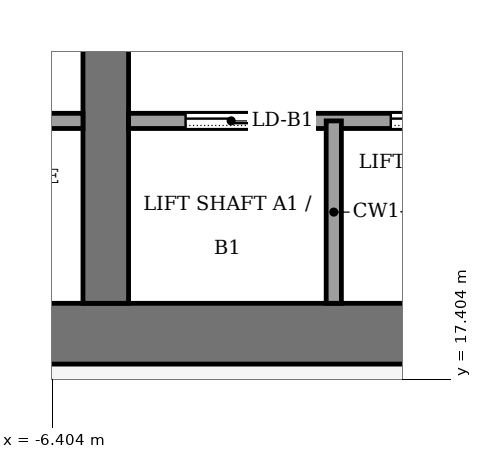
"""IFC4 building model, lengths in metres.
Left out: names, types, materials, properties, quantities, classifications, styles, units other than length and angle.
Written with IfcOpenShell. Run it as: python <this file> out.ifc"""

import sys

from ifc_helpers import new_model, si_unit, direction, frame, frame_2d, origin, place, context, subcontext, project, spatial, rectangle, extrude, element, fill, save


model = new_model("IFC4")
c1 = context("Model", 3, precision=1e-05, world=origin(), true_north=direction((0.0, 1.0)))
c2 = subcontext(c1, "Body", "Model", "MODEL_VIEW")
j1 = project(units=[si_unit("LENGTHUNIT", "METRE"), si_unit("PLANEANGLEUNIT", "RADIAN")], contexts=[c1])
p1 = place(None, origin())
s1 = spatial("IfcSite", under=j1, at=p1, CompositionType="ELEMENT")
p2 = place(p1, origin())
s2 = spatial("IfcBuilding", under=s1, at=p2, CompositionType="ELEMENT")
p3 = place(p2, frame((0.0, 0.0, 242.0)))
s3 = spatial("IfcBuildingStorey", under=s2, at=p3, CompositionType="ELEMENT", Elevation=242.0)
p4 = place(p3, frame((-13.4, 18.0, -0.13), z_axis=(0.0, 0.0, 1.0), x_axis=(1.0, 0.0, 0.0)))
e1 = element("IfcWall", 1, at=p4, inside=s3, PredefinedType="SHEAR", context=c2, shape_type="SweptSolid", body=[
    extrude(rectangle(XDim=26.8, YDim=0.8, at=frame_2d((13.4, 0.0))), origin(), (0.0, 0.0, 1.0), 4.0),
])
p5 = place(p3, frame((-5.7, 18.4, -0.13), z_axis=(0.0, 0.0, 1.0), x_axis=(0.0, 1.0, 0.0)))
e2 = element("IfcWall", 2, at=p5, inside=s3, PredefinedType="SHEAR", context=c2, shape_type="SweptSolid", body=[
    extrude(rectangle(XDim=19.2, YDim=0.6, at=frame_2d((9.6, 0.0))), origin(), (0.0, 0.0, 1.0), 4.0),
])
p6 = place(p5, frame((8.35, 0.0, 0.13)))
e3 = element("IfcOpeningElement", 3, at=p6, cuts=e2, PredefinedType="OPENING", context=c2, shape_type="SweptSolid", body=[
    extrude(rectangle(XDim=0.9, YDim=2.1, at=frame_2d((0.45, 1.05))), frame((0.0, 0.31, 0.0), z_axis=(0.0, -1.0, 0.0), x_axis=(1.0, 0.0, 0.0)), (0.0, 0.0, 1.0), 0.62),
])
p7 = place(p3, frame((-12.6, 20.8, 0.0), z_axis=(0.0, 0.0, 1.0), x_axis=(1.0, 0.0, 0.0)))
e4 = element("IfcWall", 4, at=p7, inside=s3, PredefinedType="PARTITIONING", context=c2, shape_type="SweptSolid", body=[
    extrude(rectangle(XDim=6.6, YDim=0.2, at=frame_2d((3.3, 0.0))), origin(), (0.0, 0.0, 1.0), 3.87),
])
p8 = place(p7, frame((1.15, 0.0, 0.0)))
e5 = element("IfcOpeningElement", 5, at=p8, cuts=e4, PredefinedType="OPENING", context=c2, shape_type="SweptSolid", body=[
    extrude(rectangle(XDim=1.0, YDim=2.1, at=frame_2d((0.5, 1.05))), frame((0.0, 0.11, 0.0), z_axis=(0.0, -1.0, 0.0), x_axis=(1.0, 0.0, 0.0)), (0.0, 0.0, 1.0), 0.22),
])
p9 = place(p7, frame((4.45, 0.0, 0.0)))
e6 = element("IfcOpeningElement", 6, at=p9, cuts=e4, PredefinedType="OPENING", context=c2, shape_type="SweptSolid", body=[
    extrude(rectangle(XDim=1.0, YDim=2.1, at=frame_2d((0.5, 1.05))), frame((0.0, 0.11, 0.0), z_axis=(0.0, -1.0, 0.0), x_axis=(1.0, 0.0, 0.0)), (0.0, 0.0, 1.0), 0.22),
])
p10 = place(p3, frame((-5.4, 20.8, 0.0), z_axis=(0.0, 0.0, 1.0), x_axis=(1.0, 0.0, 0.0)))
e7 = element("IfcWall", 7, at=p10, inside=s3, PredefinedType="PARTITIONING", context=c2, shape_type="SweptSolid", body=[
    extrude(rectangle(XDim=10.8, YDim=0.2, at=frame_2d((5.4, 0.0))), origin(), (0.0, 0.0, 1.0), 3.87),
])
p11 = place(p10, frame((0.75, 0.0, 0.0)))
e8 = element("IfcOpeningElement", 8, at=p11, cuts=e7, PredefinedType="OPENING", context=c2, shape_type="SweptSolid", body=[
    extrude(rectangle(XDim=1.2, YDim=2.2, at=frame_2d((0.6, 1.1))), frame((0.0, 0.11, 0.0), z_axis=(0.0, -1.0, 0.0), x_axis=(1.0, 0.0, 0.0)), (0.0, 0.0, 1.0), 0.22),
])
p12 = place(p10, frame((3.45, 0.0, 0.0)))
e9 = element("IfcOpeningElement", 9, at=p12, cuts=e7, PredefinedType="OPENING", context=c2, shape_type="SweptSolid", body=[
    extrude(rectangle(XDim=1.2, YDim=2.2, at=frame_2d((0.6, 1.1))), frame((0.0, 0.11, 0.0), z_axis=(0.0, -1.0, 0.0), x_axis=(1.0, 0.0, 0.0)), (0.0, 0.0, 1.0), 0.22),
])
p13 = place(p10, frame((6.15, 0.0, 0.0)))
e10 = element("IfcOpeningElement", 10, at=p13, cuts=e7, PredefinedType="OPENING", context=c2, shape_type="SweptSolid", body=[
    extrude(rectangle(XDim=1.2, YDim=2.2, at=frame_2d((0.6, 1.1))), frame((0.0, 0.11, 0.0), z_axis=(0.0, -1.0, 0.0), x_axis=(1.0, 0.0, 0.0)), (0.0, 0.0, 1.0), 0.22),
])
p14 = place(p10, frame((8.85, 0.0, 0.0)))
e11 = element("IfcOpeningElement", 11, at=p14, cuts=e7, PredefinedType="OPENING", context=c2, shape_type="SweptSolid", body=[
    extrude(rectangle(XDim=1.2, YDim=2.2, at=frame_2d((0.6, 1.1))), frame((0.0, 0.11, 0.0), z_axis=(0.0, -1.0, 0.0), x_axis=(1.0, 0.0, 0.0)), (0.0, 0.0, 1.0), 0.22),
])
p15 = place(p3, frame((-2.7, 18.4, 0.0), z_axis=(0.0, 0.0, 1.0), x_axis=(0.0, 1.0, 0.0)))
e12 = element("IfcWall", 12, at=p15, inside=s3, PredefinedType="PARTITIONING", context=c2, shape_type="SweptSolid", body=[
    extrude(rectangle(XDim=2.4, YDim=0.2, at=frame_2d((1.2, 0.0))), origin(), (0.0, 0.0, 1.0), 3.87),
])
p16 = place(p11, origin())
e13 = element("IfcDoor", 13, at=p16, inside=s3, OperationType="SLIDING_TO_LEFT", PredefinedType="DOOR", context=c2, shape_type="SweptSolid", body=[
    extrude(rectangle(XDim=1.2, YDim=2.2, at=frame_2d((0.6, 1.1))), frame((0.0, 0.025, 0.0), z_axis=(0.0, -1.0, 0.0), x_axis=(1.0, 0.0, 0.0)), (0.0, 0.0, 1.0), 0.05),
])
fill(e8, e13)
p17 = place(p12, origin())
e14 = element("IfcDoor", 14, at=p17, inside=s3, OperationType="SLIDING_TO_LEFT", PredefinedType="DOOR", context=c2, shape_type="SweptSolid", body=[
    extrude(rectangle(XDim=1.2, YDim=2.2, at=frame_2d((0.6, 1.1))), frame((0.0, 0.025, 0.0), z_axis=(0.0, -1.0, 0.0), x_axis=(1.0, 0.0, 0.0)), (0.0, 0.0, 1.0), 0.05),
])
fill(e9, e14)
save(model, sys.argv[1])
